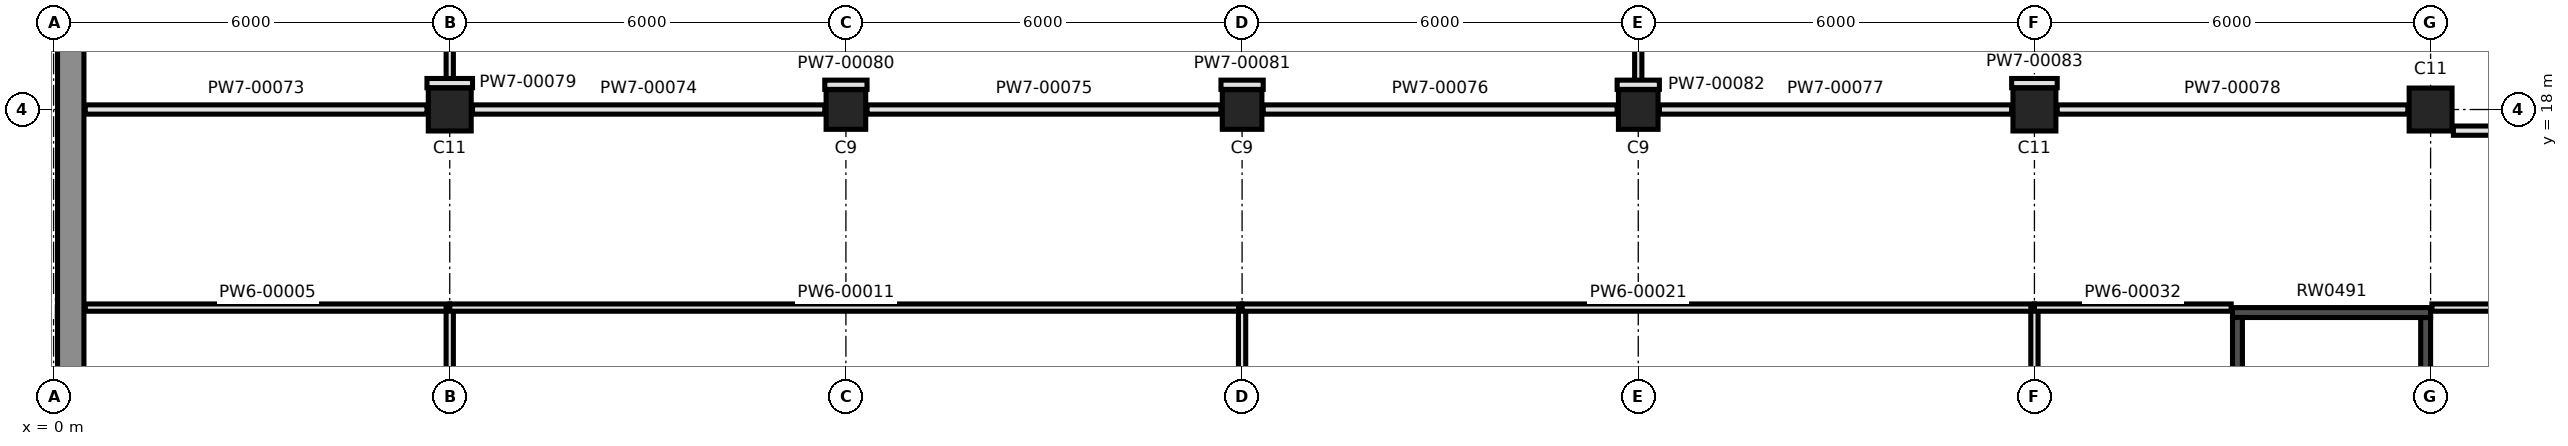
"""IFC4 building model, lengths in metres.
Left out: names, types, materials, properties, quantities, classifications, styles, units other than length and angle.
Written with IfcOpenShell. Run it as: python <this file> out.ifc"""

import sys

from ifc_helpers import new_model, si_unit, direction, frame, frame_2d, origin, origin_2d, place, context, subcontext, project, spatial, rectangle, extrude, element, fill, save


model = new_model("IFC4")
c1 = context("Model", 3, precision=1e-05, world=origin(), true_north=direction((0.0, 1.0)))
c2 = subcontext(c1, "Body", "Model", "MODEL_VIEW")
j1 = project(units=[si_unit("LENGTHUNIT", "METRE"), si_unit("PLANEANGLEUNIT", "RADIAN")], contexts=[c1])
p1 = place(None, origin())
s1 = spatial("IfcSite", under=j1, at=p1, CompositionType="ELEMENT")
p2 = place(p1, origin())
s2 = spatial("IfcBuilding", under=s1, at=p2, CompositionType="ELEMENT")
p3 = place(p2, origin())
s3 = spatial("IfcBuildingStorey", under=s2, at=p3, CompositionType="ELEMENT", Elevation=0.0)
p4 = place(p3, frame((6.0, 18.0, -0.3), z_axis=(0.0, 0.0, 1.0), x_axis=(1.0, 0.0, 0.0)))
e1 = element("IfcColumn", 1, at=p4, inside=s3, PredefinedType="COLUMN", context=c2, shape_type="SweptSolid", body=[
    extrude(rectangle(XDim=0.65, YDim=0.65, at=origin_2d()), origin(), (0.0, 0.0, 1.0), 7.3),
])
for number, where, z_axis, x_axis in (
    (2, (12.0, 18.0, -0.3), (0.0, 0.0, 1.0), (1.0, 0.0, 0.0)),
    (3, (18.0, 18.0, -0.3), (0.0, 0.0, 1.0), (1.0, 0.0, 0.0)),
    (4, (24.0, 18.0, -0.3), (0.0, 0.0, 1.0), (1.0, 0.0, 0.0)),
):
    element("IfcColumn", number, at=place(p3, frame(where, z_axis=z_axis, x_axis=x_axis)), inside=s3, PredefinedType="COLUMN", context=c2, shape_type="SweptSolid", body=[
        extrude(rectangle(XDim=0.6, YDim=0.6, at=origin_2d()), origin(), (0.0, 0.0, 1.0), 7.3),
    ])
for number, where, z_axis, x_axis in (
    (5, (30.0, 18.0, -0.3), (0.0, 0.0, 1.0), (1.0, 0.0, 0.0)),
    (6, (36.0, 18.0, -0.3), (0.0, 0.0, 1.0), (1.0, 0.0, 0.0)),
):
    element("IfcColumn", number, at=place(p3, frame(where, z_axis=z_axis, x_axis=x_axis)), inside=s3, PredefinedType="COLUMN", context=c2, shape_type="SweptSolid", body=[
        extrude(rectangle(XDim=0.65, YDim=0.65, at=origin_2d()), origin(), (0.0, 0.0, 1.0), 7.3),
    ])
p5 = place(p3, frame((33.0, 14.925, -0.3), z_axis=(0.0, 0.0, 1.0), x_axis=(1.0, 0.0, 0.0)))
e7 = element("IfcWall", 7, at=p5, inside=s3, PredefinedType="SHEAR", context=c2, shape_type="SweptSolid", body=[
    extrude(rectangle(XDim=3.0, YDim=0.15, at=frame_2d((1.5, 0.0))), origin(), (0.0, 0.0, 1.0), 7.3),
])
p6 = place(p5, frame((1.15, 0.0, 0.3)))
e8 = element("IfcOpeningElement", 8, at=p6, cuts=e7, PredefinedType="OPENING", context=c2, shape_type="SweptSolid", body=[
    extrude(rectangle(XDim=0.6, YDim=2.04, at=frame_2d((0.3, 1.02))), frame((0.0, 0.085, 0.0), z_axis=(0.0, -1.0, 0.0), x_axis=(1.0, 0.0, 0.0)), (0.0, 0.0, 1.0), 0.17),
])
for number, where, z_axis, x_axis in (
    (9, (33.075, 12.15, -0.3), (0.0, 0.0, 1.0), (0.0, 1.0, 0.0)),
    (10, (35.925, 12.15, -0.3), (0.0, 0.0, 1.0), (0.0, 1.0, 0.0)),
):
    element("IfcWall", number, at=place(p3, frame(where, z_axis=z_axis, x_axis=x_axis)), inside=s3, PredefinedType="SHEAR", context=c2, shape_type="SweptSolid", body=[
        extrude(rectangle(XDim=2.7, YDim=0.15, at=frame_2d((1.35, 0.0))), origin(), (0.0, 0.0, 1.0), 7.3),
    ])
p7 = place(p3, frame((0.26, 6.0, -0.3), z_axis=(0.0, 0.0, 1.0), x_axis=(0.0, 1.0, 0.0)))
e11 = element("IfcWall", 11, at=p7, inside=s3, PredefinedType="SOLIDWALL", context=c2, shape_type="SweptSolid", body=[
    extrude(rectangle(XDim=18.0, YDim=0.4, at=frame_2d((9.0, 0.0))), origin(), (0.0, 0.0, 1.0), 7.3),
])
p8 = place(p3, frame((0.48, 15.0, 0.0), z_axis=(0.0, 0.0, 1.0), x_axis=(1.0, 0.0, 0.0)))
e12 = element("IfcWall", 12, at=p8, inside=s3, PredefinedType="PARTITIONING", context=c2, shape_type="SweptSolid", body=[
    extrude(rectangle(XDim=5.52, YDim=0.11, at=frame_2d((2.76, 0.0))), origin(), (0.0, 0.0, 1.0), 6.05),
])
p9 = place(p8, frame((2.07, 0.0, 0.0)))
e13 = element("IfcOpeningElement", 13, at=p9, cuts=e12, PredefinedType="OPENING", context=c2, shape_type="SweptSolid", body=[
    extrude(rectangle(XDim=0.92, YDim=2.04, at=frame_2d((0.46, 1.02))), frame((0.0, 0.065, 0.0), z_axis=(0.0, -1.0, 0.0), x_axis=(1.0, 0.0, 0.0)), (0.0, 0.0, 1.0), 0.13),
])
p10 = place(p3, frame((6.0, 12.32, 0.0), z_axis=(0.0, 0.0, 1.0), x_axis=(0.0, 1.0, 0.0)))
e14 = element("IfcWall", 14, at=p10, inside=s3, PredefinedType="PARTITIONING", context=c2, shape_type="SweptSolid", body=[
    extrude(rectangle(XDim=2.68, YDim=0.11, at=frame_2d((1.34, 0.0))), origin(), (0.0, 0.0, 1.0), 6.05),
])
p11 = place(p3, frame((6.0, 15.0, 0.0), z_axis=(0.0, 0.0, 1.0), x_axis=(1.0, 0.0, 0.0)))
e15 = element("IfcWall", 15, at=p11, inside=s3, PredefinedType="PARTITIONING", context=c2, shape_type="SweptSolid", body=[
    extrude(rectangle(XDim=12.0, YDim=0.11, at=frame_2d((6.0, 0.0))), origin(), (0.0, 0.0, 1.0), 6.05),
])
p12 = place(p11, frame((4.45, 0.0, 0.0)))
e16 = element("IfcOpeningElement", 16, at=p12, cuts=e15, PredefinedType="OPENING", context=c2, shape_type="SweptSolid", body=[
    extrude(rectangle(XDim=3.0, YDim=3.0, at=frame_2d((1.5, 1.5))), frame((0.0, 0.065, 0.0), z_axis=(0.0, -1.0, 0.0), x_axis=(1.0, 0.0, 0.0)), (0.0, 0.0, 1.0), 0.13),
])
p13 = place(p3, frame((6.0, 18.345, 0.0), z_axis=(0.0, 0.0, 1.0), x_axis=(0.0, 1.0, 0.0)))
e17 = element("IfcWall", 17, at=p13, inside=s3, PredefinedType="PARTITIONING", context=c2, shape_type="SweptSolid", body=[
    extrude(rectangle(XDim=5.635, YDim=0.11, at=frame_2d((2.817, 0.0))), origin(), (0.0, 0.0, 1.0), 6.05),
])
p14 = place(p3, frame((18.0, 12.295, 0.0), z_axis=(0.0, 0.0, 1.0), x_axis=(0.0, 1.0, 0.0)))
e18 = element("IfcWall", 18, at=p14, inside=s3, PredefinedType="PARTITIONING", context=c2, shape_type="SweptSolid", body=[
    extrude(rectangle(XDim=2.705, YDim=0.11, at=frame_2d((1.353, 0.0))), origin(), (0.0, 0.0, 1.0), 6.05),
])
p15 = place(p3, frame((18.0, 15.0, 0.0), z_axis=(0.0, 0.0, 1.0), x_axis=(1.0, 0.0, 0.0)))
e19 = element("IfcWall", 19, at=p15, inside=s3, PredefinedType="PARTITIONING", context=c2, shape_type="SweptSolid", body=[
    extrude(rectangle(XDim=12.0, YDim=0.11, at=frame_2d((6.0, 0.0))), origin(), (0.0, 0.0, 1.0), 6.05),
])
p16 = place(p15, frame((4.75, 0.0, 0.0)))
e20 = element("IfcOpeningElement", 20, at=p16, cuts=e19, PredefinedType="OPENING", context=c2, shape_type="SweptSolid", body=[
    extrude(rectangle(XDim=2.4, YDim=3.0, at=frame_2d((1.2, 1.5))), frame((0.0, 0.065, 0.0), z_axis=(0.0, -1.0, 0.0), x_axis=(1.0, 0.0, 0.0)), (0.0, 0.0, 1.0), 0.13),
])
p17 = place(p3, frame((24.0, 18.32, 0.0), z_axis=(0.0, 0.0, 1.0), x_axis=(0.0, 1.0, 0.0)))
e21 = element("IfcWall", 21, at=p17, inside=s3, PredefinedType="PARTITIONING", context=c2, shape_type="SweptSolid", body=[
    extrude(rectangle(XDim=5.335, YDim=0.11, at=frame_2d((2.667, 0.0))), origin(), (0.0, 0.0, 1.0), 6.05),
])
p18 = place(p3, frame((30.0, 12.32, 0.0), z_axis=(0.0, 0.0, 1.0), x_axis=(0.0, 1.0, 0.0)))
e22 = element("IfcWall", 22, at=p18, inside=s3, PredefinedType="PARTITIONING", context=c2, shape_type="SweptSolid", body=[
    extrude(rectangle(XDim=2.68, YDim=0.11, at=frame_2d((1.34, 0.0))), origin(), (0.0, 0.0, 1.0), 6.05),
])
p19 = place(p3, frame((30.0, 15.0, 0.0), z_axis=(0.0, 0.0, 1.0), x_axis=(1.0, 0.0, 0.0)))
e23 = element("IfcWall", 23, at=p19, inside=s3, PredefinedType="PARTITIONING", context=c2, shape_type="SweptSolid", body=[
    extrude(rectangle(XDim=2.98, YDim=0.11, at=frame_2d((1.49, 0.0))), origin(), (0.0, 0.0, 1.0), 6.05),
])
p20 = place(p19, frame((1.05, 0.0, 0.0)))
e24 = element("IfcOpeningElement", 24, at=p20, cuts=e23, PredefinedType="OPENING", context=c2, shape_type="SweptSolid", body=[
    extrude(rectangle(XDim=0.92, YDim=2.04, at=frame_2d((0.46, 1.02))), frame((0.0, 0.065, 0.0), z_axis=(0.0, -1.0, 0.0), x_axis=(1.0, 0.0, 0.0)), (0.0, 0.0, 1.0), 0.13),
])
p21 = place(p3, frame((36.02, 15.0, 0.0), z_axis=(0.0, 0.0, 1.0), x_axis=(1.0, 0.0, 0.0)))
e25 = element("IfcWall", 25, at=p21, inside=s3, PredefinedType="PARTITIONING", context=c2, shape_type="SweptSolid", body=[
    extrude(rectangle(XDim=5.98, YDim=0.11, at=frame_2d((2.99, 0.0))), origin(), (0.0, 0.0, 1.0), 6.15),
])
p22 = place(p21, frame((2.53, 0.0, 0.0)))
e26 = element("IfcOpeningElement", 26, at=p22, cuts=e25, PredefinedType="OPENING", context=c2, shape_type="SweptSolid", body=[
    extrude(rectangle(XDim=0.92, YDim=2.04, at=frame_2d((0.46, 1.02))), frame((0.0, 0.065, 0.0), z_axis=(0.0, -1.0, 0.0), x_axis=(1.0, 0.0, 0.0)), (0.0, 0.0, 1.0), 0.13),
])
p23 = place(p3, frame((0.48, 18.0, 0.0), z_axis=(0.0, 0.0, 1.0), x_axis=(1.0, 0.0, 0.0)))
e27 = element("IfcWall", 27, at=p23, inside=s3, PredefinedType="PARTITIONING", context=c2, shape_type="SweptSolid", body=[
    extrude(rectangle(XDim=5.175, YDim=0.14, at=frame_2d((2.587, 0.0))), origin(), (0.0, 0.0, 1.0), 6.05),
])
p24 = place(p23, frame((2.07, 0.0, 0.0)))
e28 = element("IfcOpeningElement", 28, at=p24, cuts=e27, PredefinedType="OPENING", context=c2, shape_type="SweptSolid", body=[
    extrude(rectangle(XDim=0.92, YDim=2.04, at=frame_2d((0.46, 1.02))), frame((0.0, 0.08, 0.0), z_axis=(0.0, -1.0, 0.0), x_axis=(1.0, 0.0, 0.0)), (0.0, 0.0, 1.0), 0.16),
])
p25 = place(p3, frame((6.345, 18.0, 0.0), z_axis=(0.0, 0.0, 1.0), x_axis=(1.0, 0.0, 0.0)))
e29 = element("IfcWall", 29, at=p25, inside=s3, PredefinedType="PARTITIONING", context=c2, shape_type="SweptSolid", body=[
    extrude(rectangle(XDim=5.335, YDim=0.14, at=frame_2d((2.667, 0.0))), origin(), (0.0, 0.0, 1.0), 6.05),
])
p26 = place(p3, frame((12.32, 18.0, 0.0), z_axis=(0.0, 0.0, 1.0), x_axis=(1.0, 0.0, 0.0)))
e30 = element("IfcWall", 30, at=p26, inside=s3, PredefinedType="PARTITIONING", context=c2, shape_type="SweptSolid", body=[
    extrude(rectangle(XDim=5.36, YDim=0.14, at=frame_2d((2.68, 0.0))), origin(), (0.0, 0.0, 1.0), 6.05),
])
p27 = place(p26, frame((1.43, 0.0, 0.0)))
e31 = element("IfcOpeningElement", 31, at=p27, cuts=e30, PredefinedType="OPENING", context=c2, shape_type="SweptSolid", body=[
    extrude(rectangle(XDim=2.4, YDim=3.0, at=frame_2d((1.2, 1.5))), frame((0.0, 0.08, 0.0), z_axis=(0.0, -1.0, 0.0), x_axis=(1.0, 0.0, 0.0)), (0.0, 0.0, 1.0), 0.16),
])
p28 = place(p3, frame((18.32, 18.0, 0.0), z_axis=(0.0, 0.0, 1.0), x_axis=(1.0, 0.0, 0.0)))
e32 = element("IfcWall", 32, at=p28, inside=s3, PredefinedType="PARTITIONING", context=c2, shape_type="SweptSolid", body=[
    extrude(rectangle(XDim=5.36, YDim=0.14, at=frame_2d((2.68, 0.0))), origin(), (0.0, 0.0, 1.0), 6.05),
])
p29 = place(p3, frame((24.32, 18.0, 0.0), z_axis=(0.0, 0.0, 1.0), x_axis=(1.0, 0.0, 0.0)))
e33 = element("IfcWall", 33, at=p29, inside=s3, PredefinedType="PARTITIONING", context=c2, shape_type="SweptSolid", body=[
    extrude(rectangle(XDim=5.335, YDim=0.14, at=frame_2d((2.667, 0.0))), origin(), (0.0, 0.0, 1.0), 6.05),
])
p30 = place(p29, frame((1.73, 0.0, 0.0)))
e34 = element("IfcOpeningElement", 34, at=p30, cuts=e33, PredefinedType="OPENING", context=c2, shape_type="SweptSolid", body=[
    extrude(rectangle(XDim=1.8, YDim=2.1, at=frame_2d((0.9, 1.05))), frame((0.0, 0.08, 0.0), z_axis=(0.0, -1.0, 0.0), x_axis=(1.0, 0.0, 0.0)), (0.0, 0.0, 1.0), 0.16),
])
p31 = place(p3, frame((30.345, 18.0, 0.0), z_axis=(0.0, 0.0, 1.0), x_axis=(1.0, 0.0, 0.0)))
e35 = element("IfcWall", 35, at=p31, inside=s3, PredefinedType="PARTITIONING", context=c2, shape_type="SweptSolid", body=[
    extrude(rectangle(XDim=5.31, YDim=0.14, at=frame_2d((2.655, 0.0))), origin(), (0.0, 0.0, 1.0), 6.05),
])
p32 = place(p31, frame((1.705, 0.0, 0.0)))
e36 = element("IfcOpeningElement", 36, at=p32, cuts=e35, PredefinedType="OPENING", context=c2, shape_type="SweptSolid", body=[
    extrude(rectangle(XDim=1.8, YDim=2.1, at=frame_2d((0.9, 1.05))), frame((0.0, 0.08, 0.0), z_axis=(0.0, -1.0, 0.0), x_axis=(1.0, 0.0, 0.0)), (0.0, 0.0, 1.0), 0.16),
])
p33 = place(p3, frame((5.655, 18.4, 0.0), z_axis=(0.0, 0.0, 1.0), x_axis=(1.0, 0.0, 0.0)))
e37 = element("IfcWall", 37, at=p33, inside=s3, PredefinedType="PARTITIONING", context=c2, shape_type="SweptSolid", body=[
    extrude(rectangle(XDim=0.69, YDim=0.14, at=frame_2d((0.345, 0.0))), origin(), (0.0, 0.0, 1.0), 6.05),
])
for number, where, z_axis, x_axis in (
    (38, (11.68, 18.375, 0.0), (0.0, 0.0, 1.0), (1.0, 0.0, 0.0)),
    (39, (17.68, 18.375, 0.0), (0.0, 0.0, 1.0), (1.0, 0.0, 0.0)),
    (40, (23.68, 18.375, 0.0), (0.0, 0.0, 1.0), (1.0, 0.0, 0.0)),
):
    element("IfcWall", number, at=place(p3, frame(where, z_axis=z_axis, x_axis=x_axis)), inside=s3, PredefinedType="PARTITIONING", context=c2, shape_type="SweptSolid", body=[
        extrude(rectangle(XDim=0.64, YDim=0.14, at=frame_2d((0.32, 0.0))), origin(), (0.0, 0.0, 1.0), 6.05),
    ])
p34 = place(p3, frame((29.655, 18.4, 0.0), z_axis=(0.0, 0.0, 1.0), x_axis=(1.0, 0.0, 0.0)))
e41 = element("IfcWall", 41, at=p34, inside=s3, PredefinedType="PARTITIONING", context=c2, shape_type="SweptSolid", body=[
    extrude(rectangle(XDim=0.69, YDim=0.14, at=frame_2d((0.345, 0.0))), origin(), (0.0, 0.0, 1.0), 6.05),
])
p35 = place(p3, frame((36.345, 17.68, 0.0), z_axis=(0.0, 0.0, 1.0), x_axis=(1.0, 0.0, 0.0)))
e42 = element("IfcWall", 42, at=p35, inside=s3, PredefinedType="PARTITIONING", context=c2, shape_type="SweptSolid", body=[
    extrude(rectangle(XDim=5.355, YDim=0.14, at=frame_2d((2.677, 0.0))), origin(), (0.0, 0.0, 1.0), 6.3),
])
p36 = place(p35, frame((3.205, 0.0, 0.0)))
e43 = element("IfcOpeningElement", 43, at=p36, cuts=e42, PredefinedType="OPENING", context=c2, shape_type="SweptSolid", body=[
    extrude(rectangle(XDim=1.8, YDim=2.1, at=frame_2d((0.9, 1.05))), frame((0.0, 0.08, 0.0), z_axis=(0.0, -1.0, 0.0), x_axis=(1.0, 0.0, 0.0)), (0.0, 0.0, 1.0), 0.16),
])
p37 = place(p12, frame((3.0, 0.0, 0.0), z_axis=(0.0, 0.0, 1.0), x_axis=(-1.0, 0.0, 0.0)))
e44 = element("IfcDoor", 44, at=p37, inside=s3, OperationType="DOUBLE_DOOR_SINGLE_SWING", PredefinedType="DOOR", context=c2, shape_type="SweptSolid", body=[
    extrude(rectangle(XDim=3.0, YDim=3.0, at=frame_2d((1.5, 1.5))), frame((0.0, 0.025, 0.0), z_axis=(0.0, -1.0, 0.0), x_axis=(1.0, 0.0, 0.0)), (0.0, 0.0, 1.0), 0.05),
])
fill(e16, e44)
p38 = place(p16, frame((2.4, 0.0, 0.0), z_axis=(0.0, 0.0, 1.0), x_axis=(-1.0, 0.0, 0.0)))
e45 = element("IfcDoor", 45, at=p38, inside=s3, OperationType="DOUBLE_DOOR_SINGLE_SWING", PredefinedType="DOOR", context=c2, shape_type="SweptSolid", body=[
    extrude(rectangle(XDim=2.4, YDim=3.0, at=frame_2d((1.2, 1.5))), frame((0.0, 0.025, 0.0), z_axis=(0.0, -1.0, 0.0), x_axis=(1.0, 0.0, 0.0)), (0.0, 0.0, 1.0), 0.05),
])
fill(e20, e45)
p39 = place(p9, frame((0.92, 0.0, 0.0), z_axis=(0.0, 0.0, 1.0), x_axis=(-1.0, 0.0, 0.0)))
e46 = element("IfcDoor", 46, at=p39, inside=s3, OperationType="SINGLE_SWING_LEFT", PredefinedType="DOOR", context=c2, shape_type="SweptSolid", body=[
    extrude(rectangle(XDim=0.92, YDim=2.04, at=frame_2d((0.46, 1.02))), frame((0.0, 0.025, 0.0), z_axis=(0.0, -1.0, 0.0), x_axis=(1.0, 0.0, 0.0)), (0.0, 0.0, 1.0), 0.05),
])
fill(e13, e46)
p40 = place(p20, frame((0.92, 0.0, 0.0), z_axis=(0.0, 0.0, 1.0), x_axis=(-1.0, 0.0, 0.0)))
e47 = element("IfcDoor", 47, at=p40, inside=s3, OperationType="SINGLE_SWING_LEFT", PredefinedType="DOOR", context=c2, shape_type="SweptSolid", body=[
    extrude(rectangle(XDim=0.92, YDim=2.04, at=frame_2d((0.46, 1.02))), frame((0.0, 0.025, 0.0), z_axis=(0.0, -1.0, 0.0), x_axis=(1.0, 0.0, 0.0)), (0.0, 0.0, 1.0), 0.05),
])
fill(e24, e47)
p41 = place(p27, frame((2.4, 0.0, 0.0), z_axis=(0.0, 0.0, 1.0), x_axis=(-1.0, 0.0, 0.0)))
e48 = element("IfcDoor", 48, at=p41, inside=s3, OperationType="DOUBLE_DOOR_SINGLE_SWING", PredefinedType="DOOR", context=c2, shape_type="SweptSolid", body=[
    extrude(rectangle(XDim=2.4, YDim=3.0, at=frame_2d((1.2, 1.5))), frame((0.0, 0.025, 0.0), z_axis=(0.0, -1.0, 0.0), x_axis=(1.0, 0.0, 0.0)), (0.0, 0.0, 1.0), 0.05),
])
fill(e31, e48)
p42 = place(p24, origin())
e49 = element("IfcDoor", 49, at=p42, inside=s3, OperationType="SINGLE_SWING_RIGHT", PredefinedType="DOOR", context=c2, shape_type="SweptSolid", body=[
    extrude(rectangle(XDim=0.92, YDim=2.04, at=frame_2d((0.46, 1.02))), frame((0.0, 0.025, 0.0), z_axis=(0.0, -1.0, 0.0), x_axis=(1.0, 0.0, 0.0)), (0.0, 0.0, 1.0), 0.05),
])
fill(e28, e49)
p43 = place(p6, frame((0.6, 0.0, 0.0), z_axis=(0.0, 0.0, 1.0), x_axis=(-1.0, 0.0, 0.0)))
e50 = element("IfcDoor", 50, at=p43, inside=s3, OperationType="SINGLE_SWING_LEFT", PredefinedType="DOOR", context=c2, shape_type="SweptSolid", body=[
    extrude(rectangle(XDim=0.6, YDim=2.04, at=frame_2d((0.3, 1.02))), frame((0.0, 0.025, 0.0), z_axis=(0.0, -1.0, 0.0), x_axis=(1.0, 0.0, 0.0)), (0.0, 0.0, 1.0), 0.05),
])
fill(e8, e50)
p44 = place(p32, origin())
e51 = element("IfcDoor", 51, at=p44, inside=s3, OperationType="DOUBLE_DOOR_SINGLE_SWING", PredefinedType="DOOR", context=c2, shape_type="SweptSolid", body=[
    extrude(rectangle(XDim=1.8, YDim=2.1, at=frame_2d((0.9, 1.05))), frame((0.0, 0.025, 0.0), z_axis=(0.0, -1.0, 0.0), x_axis=(1.0, 0.0, 0.0)), (0.0, 0.0, 1.0), 0.05),
])
fill(e36, e51)
p45 = place(p30, origin())
e52 = element("IfcDoor", 52, at=p45, inside=s3, OperationType="DOUBLE_DOOR_SINGLE_SWING", PredefinedType="DOOR", context=c2, shape_type="SweptSolid", body=[
    extrude(rectangle(XDim=1.8, YDim=2.1, at=frame_2d((0.9, 1.05))), frame((0.0, 0.025, 0.0), z_axis=(0.0, -1.0, 0.0), x_axis=(1.0, 0.0, 0.0)), (0.0, 0.0, 1.0), 0.05),
])
fill(e34, e52)
save(model, sys.argv[1])
